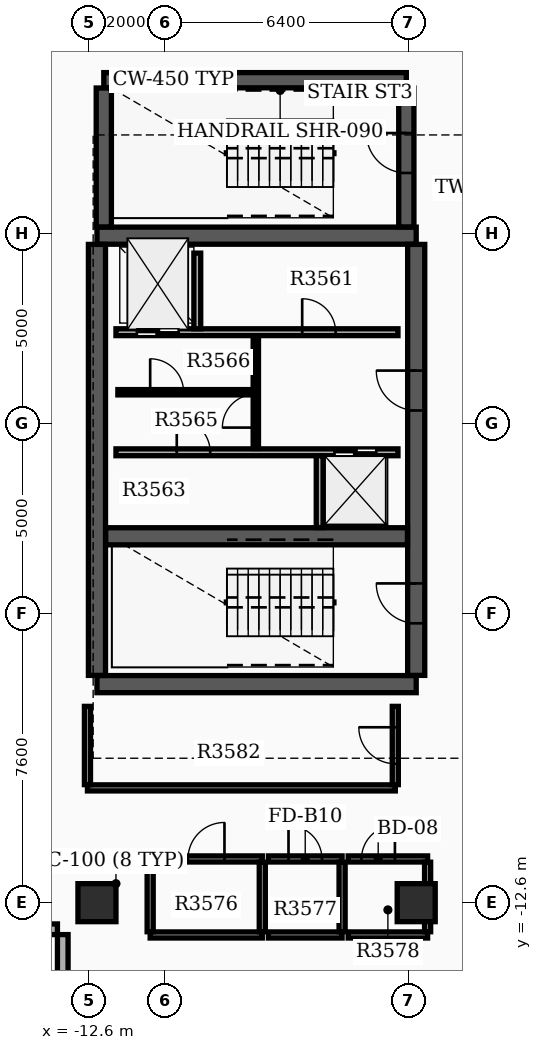
"""IFC4 building model, lengths in metres.
Left out: names, types, materials, properties, quantities, classifications, styles, units other than length and angle.
Written with IfcOpenShell. Run it as: python <this file> out.ifc"""

import sys

from ifc_helpers import new_model, si_unit, direction, frame, frame_2d, origin, origin_2d, place, context, subcontext, project, spatial, rectangle, extrude, element, fill, save


model = new_model("IFC4")
c1 = context("Model", 3, precision=1e-05, world=origin(), true_north=direction((0.0, 1.0)))
c2 = subcontext(c1, "Body", "Model", "MODEL_VIEW")
j1 = project(units=[si_unit("LENGTHUNIT", "METRE"), si_unit("PLANEANGLEUNIT", "RADIAN")], contexts=[c1])
p1 = place(None, origin())
s1 = spatial("IfcSite", under=j1, at=p1, CompositionType="ELEMENT")
p2 = place(p1, origin())
s2 = spatial("IfcBuilding", under=s1, at=p2, CompositionType="ELEMENT")
p3 = place(p2, frame((0.0, 0.0, 224.7)))
s3 = spatial("IfcBuildingStorey", under=s2, at=p3, CompositionType="ELEMENT", Elevation=224.7)
for number, where, z_axis, x_axis in (
    (1, (-12.4, -6.85, 0.0), (0.0, 0.0, 1.0), (1.0, 0.0, 0.0)),
    (2, (-12.4, 4.95, 0.0), (0.0, 0.0, 1.0), (1.0, 0.0, 0.0)),
):
    element("IfcWall", number, at=place(p3, frame(where, z_axis=z_axis, x_axis=x_axis)), inside=s3, PredefinedType="SHEAR", context=c2, shape_type="SweptSolid", body=[
        extrude(rectangle(XDim=8.4, YDim=0.45, at=frame_2d((4.2, 0.0))), origin(), (0.0, 0.0, 1.0), 3.7),
    ])
p4 = place(p3, frame((-12.4, -6.62, 0.0), z_axis=(0.0, 0.0, 1.0), x_axis=(0.0, 1.0, 0.0)))
e3 = element("IfcWall", 3, at=p4, inside=s3, PredefinedType="SHEAR", context=c2, shape_type="SweptSolid", body=[
    extrude(rectangle(XDim=11.34, YDim=0.45, at=frame_2d((5.67, 0.0))), origin(), (0.0, 0.0, 1.0), 3.7),
])
p5 = place(p3, frame((-4.0, -6.62, 0.0), z_axis=(0.0, 0.0, 1.0), x_axis=(0.0, 1.0, 0.0)))
e4 = element("IfcWall", 4, at=p5, inside=s3, PredefinedType="SHEAR", context=c2, shape_type="SweptSolid", body=[
    extrude(rectangle(XDim=11.34, YDim=0.45, at=frame_2d((5.67, 0.0))), origin(), (0.0, 0.0, 1.0), 3.7),
])
p6 = place(p5, frame((1.37, 0.0, 0.0)))
e5 = element("IfcOpeningElement", 5, at=p6, cuts=e4, PredefinedType="OPENING", context=c2, shape_type="SweptSolid", body=[
    extrude(rectangle(XDim=1.05, YDim=2.15, at=frame_2d((0.525, 1.075))), frame((0.0, 0.235, 0.0), z_axis=(0.0, -1.0, 0.0), x_axis=(1.0, 0.0, 0.0)), (0.0, 0.0, 1.0), 0.47),
])
p7 = place(p5, frame((6.97, 0.0, 0.0)))
e6 = element("IfcOpeningElement", 6, at=p7, cuts=e4, PredefinedType="OPENING", context=c2, shape_type="SweptSolid", body=[
    extrude(rectangle(XDim=1.05, YDim=2.15, at=frame_2d((0.525, 1.075))), frame((0.0, 0.235, 0.0), z_axis=(0.0, -1.0, 0.0), x_axis=(1.0, 0.0, 0.0)), (0.0, 0.0, 1.0), 0.47),
])
p8 = place(p3, frame((-12.17, -2.96, 0.0), z_axis=(0.0, 0.0, 1.0), x_axis=(1.0, 0.0, 0.0)))
e7 = element("IfcWall", 7, at=p8, inside=s3, PredefinedType="SHEAR", context=c2, shape_type="SweptSolid", body=[
    extrude(rectangle(XDim=7.94, YDim=0.45, at=frame_2d((3.97, 0.0))), origin(), (0.0, 0.0, 1.0), 3.7),
])
p9 = place(p3, frame((-12.22, 9.04, 0.0), z_axis=(0.0, 0.0, 1.0), x_axis=(1.0, 0.0, 0.0)))
e8 = element("IfcWall", 8, at=p9, inside=s3, PredefinedType="SHEAR", context=c2, shape_type="SweptSolid", body=[
    extrude(rectangle(XDim=7.96, YDim=0.4, at=frame_2d((3.98, 0.0))), origin(), (0.0, 0.0, 1.0), 3.7),
])
p10 = place(p3, frame((-12.22, 5.18, 0.0), z_axis=(0.0, 0.0, 1.0), x_axis=(0.0, 1.0, 0.0)))
e9 = element("IfcWall", 9, at=p10, inside=s3, PredefinedType="SHEAR", context=c2, shape_type="SweptSolid", body=[
    extrude(rectangle(XDim=3.655, YDim=0.4, at=frame_2d((1.828, 0.0))), origin(), (0.0, 0.0, 1.0), 3.7),
])
p11 = place(p3, frame((-4.26, 5.18, 0.0), z_axis=(0.0, 0.0, 1.0), x_axis=(0.0, 1.0, 0.0)))
e10 = element("IfcWall", 10, at=p11, inside=s3, PredefinedType="SHEAR", context=c2, shape_type="SweptSolid", body=[
    extrude(rectangle(XDim=3.655, YDim=0.4, at=frame_2d((1.828, 0.0))), origin(), (0.0, 0.0, 1.0), 3.7),
])
p12 = place(p11, frame((1.42, 0.0, 0.0)))
e11 = element("IfcOpeningElement", 11, at=p12, cuts=e10, PredefinedType="OPENING", context=c2, shape_type="SweptSolid", body=[
    extrude(rectangle(XDim=1.05, YDim=2.15, at=frame_2d((0.525, 1.075))), frame((0.0, 0.21, 0.0), z_axis=(0.0, -1.0, 0.0), x_axis=(1.0, 0.0, 0.0)), (0.0, 0.0, 1.0), 0.42),
])
for number, where, z_axis, x_axis in (
    (12, (-12.4, -12.6, 0.0), (0.0, 0.0, 1.0), (1.0, 0.0, 0.0)),
    (13, (-4.0, -12.6, 0.0), (0.0, 0.0, 1.0), (1.0, 0.0, 0.0)),
):
    element("IfcColumn", number, at=place(p3, frame(where, z_axis=z_axis, x_axis=x_axis)), inside=s3, PredefinedType="COLUMN", context=c2, shape_type="SweptSolid", body=[
        extrude(rectangle(XDim=1.0, YDim=1.0, at=origin_2d()), origin(), (0.0, 0.0, 1.0), 3.9),
    ])
p13 = place(p3, frame((-14.66, -13.3, 0.0), z_axis=(0.0, 0.0, 1.0), x_axis=(1.0, 0.0, 0.0)))
e14 = element("IfcWall", 14, at=p13, inside=s3, PredefinedType="STANDARD", context=c2, shape_type="SweptSolid", body=[
    extrude(rectangle(XDim=1.22, YDim=0.28, at=frame_2d((0.61, 0.0))), origin(), (0.0, 0.0, 1.0), 3.18),
])
p14 = place(p3, frame((-13.3, -13.44, 0.0), z_axis=(0.0, 0.0, 1.0), x_axis=(0.0, -1.0, 0.0)))
e15 = element("IfcWall", 15, at=p14, inside=s3, PredefinedType="STANDARD", context=c2, shape_type="SweptSolid", body=[
    extrude(rectangle(XDim=1.5, YDim=0.28, at=frame_2d((0.75, 0.0))), origin(), (0.0, 0.0, 1.0), 3.18),
])
p15 = place(p3, frame((-11.9, 2.41, 0.0), z_axis=(0.0, 0.0, 1.0), x_axis=(1.0, 0.0, 0.0)))
e16 = element("IfcWall", 16, at=p15, inside=s3, PredefinedType="SOLIDWALL", context=c2, shape_type="SweptSolid", body=[
    extrude(rectangle(XDim=7.42, YDim=0.18, at=frame_2d((3.71, 0.0))), origin(), (0.0, 0.0, 1.0), 3.17),
])
p16 = place(p15, frame((0.55, 0.0, 0.0)))
e17 = element("IfcOpeningElement", 17, at=p16, cuts=e16, PredefinedType="OPENING", context=c2, shape_type="SweptSolid", body=[
    extrude(rectangle(XDim=1.1, YDim=2.15, at=frame_2d((0.55, 1.075))), frame((0.0, 0.1, 0.0), z_axis=(0.0, -1.0, 0.0), x_axis=(1.0, 0.0, 0.0)), (0.0, 0.0, 1.0), 0.2),
])
p17 = place(p15, frame((4.9, 0.0, 0.0)))
e18 = element("IfcOpeningElement", 18, at=p17, cuts=e16, PredefinedType="OPENING", context=c2, shape_type="SweptSolid", body=[
    extrude(rectangle(XDim=0.88, YDim=2.1, at=frame_2d((0.44, 1.05))), frame((0.0, 0.1, 0.0), z_axis=(0.0, -1.0, 0.0), x_axis=(1.0, 0.0, 0.0)), (0.0, 0.0, 1.0), 0.2),
])
p18 = place(p3, frame((-11.9, -0.75, 0.0), z_axis=(0.0, 0.0, 1.0), x_axis=(1.0, 0.0, 0.0)))
e19 = element("IfcWall", 19, at=p18, inside=s3, PredefinedType="SOLIDWALL", context=c2, shape_type="SweptSolid", body=[
    extrude(rectangle(XDim=7.42, YDim=0.18, at=frame_2d((3.71, 0.0))), origin(), (0.0, 0.0, 1.0), 3.17),
])
p19 = place(p18, frame((5.75, 0.0, 0.0)))
e20 = element("IfcOpeningElement", 20, at=p19, cuts=e19, PredefinedType="OPENING", context=c2, shape_type="SweptSolid", body=[
    extrude(rectangle(XDim=1.1, YDim=2.15, at=frame_2d((0.55, 1.075))), frame((0.0, 0.1, 0.0), z_axis=(0.0, -1.0, 0.0), x_axis=(1.0, 0.0, 0.0)), (0.0, 0.0, 1.0), 0.2),
])
p20 = place(p18, frame((1.6, 0.0, 0.0)))
e21 = element("IfcOpeningElement", 21, at=p20, cuts=e19, PredefinedType="OPENING", context=c2, shape_type="SweptSolid", body=[
    extrude(rectangle(XDim=0.88, YDim=2.1, at=frame_2d((0.44, 1.05))), frame((0.0, 0.1, 0.0), z_axis=(0.0, -1.0, 0.0), x_axis=(1.0, 0.0, 0.0)), (0.0, 0.0, 1.0), 0.2),
])
p21 = place(p3, frame((-9.76, 2.5, 0.0), z_axis=(0.0, 0.0, 1.0), x_axis=(0.0, 1.0, 0.0)))
e22 = element("IfcWall", 22, at=p21, inside=s3, PredefinedType="SOLIDWALL", context=c2, shape_type="SweptSolid", body=[
    extrude(rectangle(XDim=1.99, YDim=0.18, at=frame_2d((0.995, 0.0))), origin(), (0.0, 0.0, 1.0), 3.17),
])
p22 = place(p3, frame((-6.54, -2.73, 0.0), z_axis=(0.0, 0.0, 1.0), x_axis=(0.0, 1.0, 0.0)))
e23 = element("IfcWall", 23, at=p22, inside=s3, PredefinedType="SOLIDWALL", context=c2, shape_type="SweptSolid", body=[
    extrude(rectangle(XDim=1.89, YDim=0.18, at=frame_2d((0.945, 0.0))), origin(), (0.0, 0.0, 1.0), 3.17),
])
p23 = place(p3, frame((-8.22, -0.65, 0.0), z_axis=(0.0, 0.0, 1.0), x_axis=(0.0, 1.0, 0.0)))
e24 = element("IfcWall", 24, at=p23, inside=s3, PredefinedType="SOLIDWALL", context=c2, shape_type="SweptSolid", body=[
    extrude(rectangle(XDim=2.96, YDim=0.14, at=frame_2d((1.48, 0.0))), origin(), (0.0, 0.0, 1.0), 3.17),
])
p24 = place(p23, frame((0.55, 0.0, 0.0)))
e25 = element("IfcOpeningElement", 25, at=p24, cuts=e24, PredefinedType="OPENING", context=c2, shape_type="SweptSolid", body=[
    extrude(rectangle(XDim=0.88, YDim=2.1, at=frame_2d((0.44, 1.05))), frame((0.0, 0.08, 0.0), z_axis=(0.0, -1.0, 0.0), x_axis=(1.0, 0.0, 0.0)), (0.0, 0.0, 1.0), 0.16),
])
p25 = place(p3, frame((-11.85, 0.83, 0.0), z_axis=(0.0, 0.0, 1.0), x_axis=(1.0, 0.0, 0.0)))
e26 = element("IfcWall", 26, at=p25, inside=s3, PredefinedType="PARTITIONING", context=c2, shape_type="SweptSolid", body=[
    extrude(rectangle(XDim=3.552, YDim=0.14, at=frame_2d((1.776, 0.0))), origin(), (0.0, 0.0, 1.0), 3.17),
])
p26 = place(p25, frame((0.85, 0.0, 0.0)))
e27 = element("IfcOpeningElement", 27, at=p26, cuts=e26, PredefinedType="OPENING", context=c2, shape_type="SweptSolid", body=[
    extrude(rectangle(XDim=0.88, YDim=2.1, at=frame_2d((0.44, 1.05))), frame((0.0, 0.08, 0.0), z_axis=(0.0, -1.0, 0.0), x_axis=(1.0, 0.0, 0.0)), (0.0, 0.0, 1.0), 0.16),
])
p27 = place(p3, frame((-11.0, -13.45, 0.0), z_axis=(0.0, 0.0, 1.0), x_axis=(1.0, 0.0, 0.0)))
e28 = element("IfcWall", 28, at=p27, inside=s3, PredefinedType="PARTITIONING", context=c2, shape_type="SweptSolid", body=[
    extrude(rectangle(XDim=2.95, YDim=0.16, at=frame_2d((1.475, 0.0))), origin(), (0.0, 0.0, 1.0), 3.17),
])
p28 = place(p3, frame((-11.0, -11.45, 0.0), z_axis=(0.0, 0.0, 1.0), x_axis=(1.0, 0.0, 0.0)))
e29 = element("IfcWall", 29, at=p28, inside=s3, PredefinedType="PARTITIONING", context=c2, shape_type="SweptSolid", body=[
    extrude(rectangle(XDim=2.95, YDim=0.16, at=frame_2d((1.475, 0.0))), origin(), (0.0, 0.0, 1.0), 3.17),
])
p29 = place(p28, frame((0.995, 0.0, 0.0)))
e30 = element("IfcOpeningElement", 30, at=p29, cuts=e29, PredefinedType="OPENING", context=c2, shape_type="SweptSolid", body=[
    extrude(rectangle(XDim=0.96, YDim=2.15, at=frame_2d((0.48, 1.075))), frame((0.0, 0.09, 0.0), z_axis=(0.0, -1.0, 0.0), x_axis=(1.0, 0.0, 0.0)), (0.0, 0.0, 1.0), 0.18),
])
for number, where, z_axis, x_axis in (
    (31, (-11.0, -13.365, 0.0), (0.0, 0.0, 1.0), (0.0, 1.0, 0.0)),
    (32, (-8.05, -13.365, 0.0), (0.0, 0.0, 1.0), (0.0, 1.0, 0.0)),
):
    element("IfcWall", number, at=place(p3, frame(where, z_axis=z_axis, x_axis=x_axis)), inside=s3, PredefinedType="PARTITIONING", context=c2, shape_type="SweptSolid", body=[
        extrude(rectangle(XDim=1.83, YDim=0.16, at=frame_2d((0.915, 0.0))), origin(), (0.0, 0.0, 1.0), 3.17),
    ])
p30 = place(p3, frame((-7.89, -13.45, 0.0), z_axis=(0.0, 0.0, 1.0), x_axis=(1.0, 0.0, 0.0)))
e33 = element("IfcWall", 33, at=p30, inside=s3, PredefinedType="PARTITIONING", context=c2, shape_type="SweptSolid", body=[
    extrude(rectangle(XDim=1.94, YDim=0.16, at=frame_2d((0.97, 0.0))), origin(), (0.0, 0.0, 1.0), 3.17),
])
p31 = place(p3, frame((-7.89, -11.45, 0.0), z_axis=(0.0, 0.0, 1.0), x_axis=(1.0, 0.0, 0.0)))
e34 = element("IfcWall", 34, at=p31, inside=s3, PredefinedType="PARTITIONING", context=c2, shape_type="SweptSolid", body=[
    extrude(rectangle(XDim=1.94, YDim=0.16, at=frame_2d((0.97, 0.0))), origin(), (0.0, 0.0, 1.0), 3.17),
])
p32 = place(p31, frame((0.53, 0.0, 0.0)))
e35 = element("IfcOpeningElement", 35, at=p32, cuts=e34, PredefinedType="OPENING", context=c2, shape_type="SweptSolid", body=[
    extrude(rectangle(XDim=0.88, YDim=2.1, at=frame_2d((0.44, 1.05))), frame((0.0, 0.09, 0.0), z_axis=(0.0, -1.0, 0.0), x_axis=(1.0, 0.0, 0.0)), (0.0, 0.0, 1.0), 0.18),
])
p33 = place(p3, frame((-5.95, -13.365, 0.0), z_axis=(0.0, 0.0, 1.0), x_axis=(0.0, 1.0, 0.0)))
e36 = element("IfcWall", 36, at=p33, inside=s3, PredefinedType="PARTITIONING", context=c2, shape_type="SweptSolid", body=[
    extrude(rectangle(XDim=1.83, YDim=0.16, at=frame_2d((0.915, 0.0))), origin(), (0.0, 0.0, 1.0), 3.17),
])
p34 = place(p3, frame((-5.79, -13.45, 0.0), z_axis=(0.0, 0.0, 1.0), x_axis=(1.0, 0.0, 0.0)))
e37 = element("IfcWall", 37, at=p34, inside=s3, PredefinedType="PARTITIONING", context=c2, shape_type="SweptSolid", body=[
    extrude(rectangle(XDim=2.09, YDim=0.16, at=frame_2d((1.045, 0.0))), origin(), (0.0, 0.0, 1.0), 3.17),
])
p35 = place(p3, frame((-5.79, -11.45, 0.0), z_axis=(0.0, 0.0, 1.0), x_axis=(1.0, 0.0, 0.0)))
e38 = element("IfcWall", 38, at=p35, inside=s3, PredefinedType="PARTITIONING", context=c2, shape_type="SweptSolid", body=[
    extrude(rectangle(XDim=2.09, YDim=0.16, at=frame_2d((1.045, 0.0))), origin(), (0.0, 0.0, 1.0), 3.17),
])
p36 = place(p35, frame((0.35, 0.0, 0.0)))
e39 = element("IfcOpeningElement", 39, at=p36, cuts=e38, PredefinedType="OPENING", context=c2, shape_type="SweptSolid", body=[
    extrude(rectangle(XDim=0.88, YDim=2.15, at=frame_2d((0.44, 1.075))), frame((0.0, 0.09, 0.0), z_axis=(0.0, -1.0, 0.0), x_axis=(1.0, 0.0, 0.0)), (0.0, 0.0, 1.0), 0.18),
])
p37 = place(p3, frame((-3.7, -13.365, 0.0), z_axis=(0.0, 0.0, 1.0), x_axis=(0.0, 1.0, 0.0)))
e40 = element("IfcWall", 40, at=p37, inside=s3, PredefinedType="PARTITIONING", context=c2, shape_type="SweptSolid", body=[
    extrude(rectangle(XDim=1.83, YDim=0.16, at=frame_2d((0.915, 0.0))), origin(), (0.0, 0.0, 1.0), 3.17),
])
p38 = place(p3, frame((-12.65, -9.58, 0.0), z_axis=(0.0, 0.0, 1.0), x_axis=(1.0, 0.0, 0.0)))
e41 = element("IfcWall", 41, at=p38, inside=s3, PredefinedType="PARTITIONING", context=c2, shape_type="SweptSolid", body=[
    extrude(rectangle(XDim=8.1, YDim=0.16, at=frame_2d((4.05, 0.0))), origin(), (0.0, 0.0, 1.0), 3.17),
])
p39 = place(p3, frame((-12.65, -9.495, 0.0), z_axis=(0.0, 0.0, 1.0), x_axis=(0.0, 1.0, 0.0)))
e42 = element("IfcWall", 42, at=p39, inside=s3, PredefinedType="PARTITIONING", context=c2, shape_type="SweptSolid", body=[
    extrude(rectangle(XDim=2.06, YDim=0.16, at=frame_2d((1.03, 0.0))), origin(), (0.0, 0.0, 1.0), 3.17),
])
p40 = place(p3, frame((-4.55, -9.495, 0.0), z_axis=(0.0, 0.0, 1.0), x_axis=(0.0, 1.0, 0.0)))
e43 = element("IfcWall", 43, at=p40, inside=s3, PredefinedType="PARTITIONING", context=c2, shape_type="SweptSolid", body=[
    extrude(rectangle(XDim=2.06, YDim=0.16, at=frame_2d((1.03, 0.0))), origin(), (0.0, 0.0, 1.0), 3.17),
])
p41 = place(p40, frame((0.55, 0.0, 0.0)))
e44 = element("IfcOpeningElement", 44, at=p41, cuts=e43, PredefinedType="OPENING", context=c2, shape_type="SweptSolid", body=[
    extrude(rectangle(XDim=0.96, YDim=2.15, at=frame_2d((0.48, 1.075))), frame((0.0, 0.09, 0.0), z_axis=(0.0, -1.0, 0.0), x_axis=(1.0, 0.0, 0.0)), (0.0, 0.0, 1.0), 0.18),
])
p42 = place(p6, origin())
e45 = element("IfcDoor", 45, at=p42, inside=s3, OperationType="SINGLE_SWING_RIGHT", PredefinedType="DOOR", context=c2, shape_type="SweptSolid", body=[
    extrude(rectangle(XDim=1.05, YDim=2.15, at=frame_2d((0.525, 1.075))), frame((0.0, 0.025, 0.0), z_axis=(0.0, -1.0, 0.0), x_axis=(1.0, 0.0, 0.0)), (0.0, 0.0, 1.0), 0.05),
])
fill(e5, e45)
p43 = place(p7, origin())
e46 = element("IfcDoor", 46, at=p43, inside=s3, OperationType="SINGLE_SWING_RIGHT", PredefinedType="DOOR", context=c2, shape_type="SweptSolid", body=[
    extrude(rectangle(XDim=1.05, YDim=2.15, at=frame_2d((0.525, 1.075))), frame((0.0, 0.025, 0.0), z_axis=(0.0, -1.0, 0.0), x_axis=(1.0, 0.0, 0.0)), (0.0, 0.0, 1.0), 0.05),
])
fill(e6, e46)
p44 = place(p12, origin())
e47 = element("IfcDoor", 47, at=p44, inside=s3, OperationType="SINGLE_SWING_RIGHT", PredefinedType="DOOR", context=c2, shape_type="SweptSolid", body=[
    extrude(rectangle(XDim=1.05, YDim=2.15, at=frame_2d((0.525, 1.075))), frame((0.0, 0.025, 0.0), z_axis=(0.0, -1.0, 0.0), x_axis=(1.0, 0.0, 0.0)), (0.0, 0.0, 1.0), 0.05),
])
fill(e11, e47)
p45 = place(p16, origin())
e48 = element("IfcDoor", 48, at=p45, inside=s3, OperationType="DOUBLE_DOOR_SLIDING", PredefinedType="DOOR", context=c2, shape_type="SweptSolid", body=[
    extrude(rectangle(XDim=1.1, YDim=2.15, at=frame_2d((0.55, 1.075))), frame((0.0, 0.025, 0.0), z_axis=(0.0, -1.0, 0.0), x_axis=(1.0, 0.0, 0.0)), (0.0, 0.0, 1.0), 0.05),
])
fill(e17, e48)
p46 = place(p19, origin())
e49 = element("IfcDoor", 49, at=p46, inside=s3, OperationType="DOUBLE_DOOR_SLIDING", PredefinedType="DOOR", context=c2, shape_type="SweptSolid", body=[
    extrude(rectangle(XDim=1.1, YDim=2.15, at=frame_2d((0.55, 1.075))), frame((0.0, 0.025, 0.0), z_axis=(0.0, -1.0, 0.0), x_axis=(1.0, 0.0, 0.0)), (0.0, 0.0, 1.0), 0.05),
])
fill(e20, e49)
p47 = place(p17, origin())
e50 = element("IfcDoor", 50, at=p47, inside=s3, OperationType="SINGLE_SWING_LEFT", PredefinedType="DOOR", context=c2, shape_type="SweptSolid", body=[
    extrude(rectangle(XDim=0.88, YDim=2.1, at=frame_2d((0.44, 1.05))), frame((0.0, 0.025, 0.0), z_axis=(0.0, -1.0, 0.0), x_axis=(1.0, 0.0, 0.0)), (0.0, 0.0, 1.0), 0.05),
])
fill(e18, e50)
p48 = place(p20, origin())
e51 = element("IfcDoor", 51, at=p48, inside=s3, OperationType="SINGLE_SWING_LEFT", PredefinedType="DOOR", context=c2, shape_type="SweptSolid", body=[
    extrude(rectangle(XDim=0.88, YDim=2.1, at=frame_2d((0.44, 1.05))), frame((0.0, 0.025, 0.0), z_axis=(0.0, -1.0, 0.0), x_axis=(1.0, 0.0, 0.0)), (0.0, 0.0, 1.0), 0.05),
])
fill(e21, e51)
p49 = place(p24, origin())
e52 = element("IfcDoor", 52, at=p49, inside=s3, OperationType="SINGLE_SWING_LEFT", PredefinedType="DOOR", context=c2, shape_type="SweptSolid", body=[
    extrude(rectangle(XDim=0.88, YDim=2.1, at=frame_2d((0.44, 1.05))), frame((0.0, 0.025, 0.0), z_axis=(0.0, -1.0, 0.0), x_axis=(1.0, 0.0, 0.0)), (0.0, 0.0, 1.0), 0.05),
])
fill(e25, e52)
p50 = place(p26, origin())
e53 = element("IfcDoor", 53, at=p50, inside=s3, OperationType="SINGLE_SWING_LEFT", PredefinedType="DOOR", context=c2, shape_type="SweptSolid", body=[
    extrude(rectangle(XDim=0.88, YDim=2.1, at=frame_2d((0.44, 1.05))), frame((0.0, 0.025, 0.0), z_axis=(0.0, -1.0, 0.0), x_axis=(1.0, 0.0, 0.0)), (0.0, 0.0, 1.0), 0.05),
])
fill(e27, e53)
p51 = place(p29, origin())
e54 = element("IfcDoor", 54, at=p51, inside=s3, OperationType="SINGLE_SWING_RIGHT", PredefinedType="DOOR", context=c2, shape_type="SweptSolid", body=[
    extrude(rectangle(XDim=0.96, YDim=2.15, at=frame_2d((0.48, 1.075))), frame((0.0, 0.025, 0.0), z_axis=(0.0, -1.0, 0.0), x_axis=(1.0, 0.0, 0.0)), (0.0, 0.0, 1.0), 0.05),
])
fill(e30, e54)
p52 = place(p32, origin())
e55 = element("IfcDoor", 55, at=p52, inside=s3, OperationType="SINGLE_SWING_LEFT", PredefinedType="DOOR", context=c2, shape_type="SweptSolid", body=[
    extrude(rectangle(XDim=0.88, YDim=2.1, at=frame_2d((0.44, 1.05))), frame((0.0, 0.025, 0.0), z_axis=(0.0, -1.0, 0.0), x_axis=(1.0, 0.0, 0.0)), (0.0, 0.0, 1.0), 0.05),
])
fill(e35, e55)
p53 = place(p36, origin())
e56 = element("IfcDoor", 56, at=p53, inside=s3, OperationType="SINGLE_SWING_RIGHT", PredefinedType="DOOR", context=c2, shape_type="SweptSolid", body=[
    extrude(rectangle(XDim=0.88, YDim=2.15, at=frame_2d((0.44, 1.075))), frame((0.0, 0.025, 0.0), z_axis=(0.0, -1.0, 0.0), x_axis=(1.0, 0.0, 0.0)), (0.0, 0.0, 1.0), 0.05),
])
fill(e39, e56)
p54 = place(p41, origin())
e57 = element("IfcDoor", 57, at=p54, inside=s3, OperationType="SINGLE_SWING_RIGHT", PredefinedType="DOOR", context=c2, shape_type="SweptSolid", body=[
    extrude(rectangle(XDim=0.96, YDim=2.15, at=frame_2d((0.48, 1.075))), frame((0.0, 0.025, 0.0), z_axis=(0.0, -1.0, 0.0), x_axis=(1.0, 0.0, 0.0)), (0.0, 0.0, 1.0), 0.05),
])
fill(e44, e57)
save(model, sys.argv[1])
